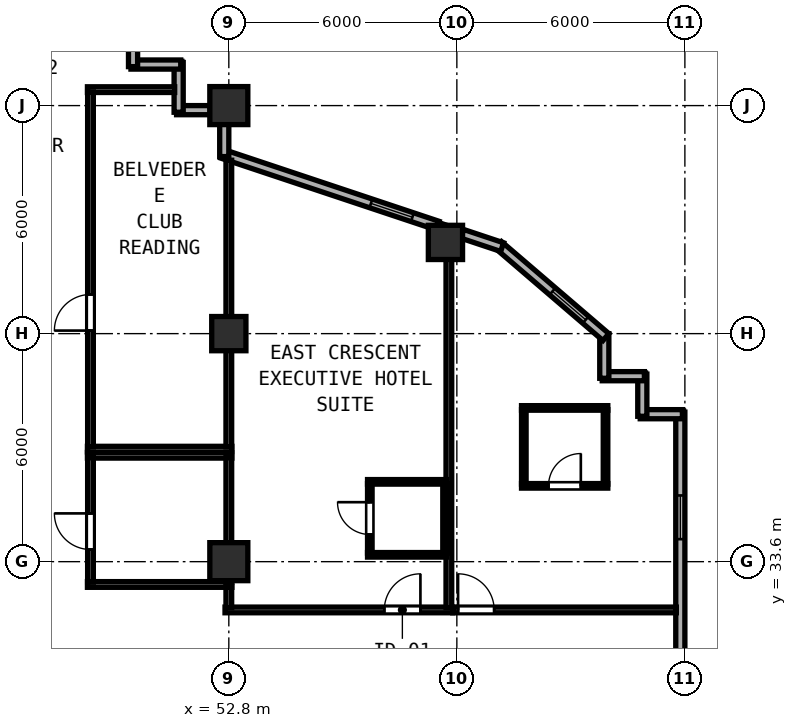
"""IFC4 building model, lengths in metres.
Left out: names, types, materials, properties, quantities, classifications, styles, units other than length and angle.
Written with IfcOpenShell. Run it as: python <this file> out.ifc"""

import sys

from ifc_helpers import new_model, si_unit, direction, frame, frame_2d, origin, origin_2d, place, context, subcontext, project, spatial, rectangle, hollow_rectangle, extrude, element, fill, save


model = new_model("IFC4")
c1 = context("Model", 3, precision=1e-05, world=origin(), true_north=direction((0.0, 1.0)))
c2 = subcontext(c1, "Body", "Model", "MODEL_VIEW")
j1 = project(units=[si_unit("LENGTHUNIT", "METRE"), si_unit("PLANEANGLEUNIT", "RADIAN")], contexts=[c1])
p1 = place(None, origin())
s1 = spatial("IfcSite", under=j1, at=p1, CompositionType="ELEMENT")
p2 = place(p1, origin())
s2 = spatial("IfcBuilding", under=s1, at=p2, CompositionType="ELEMENT")
p3 = place(p2, frame((0.0, 0.0, 98.4)))
s3 = spatial("IfcBuildingStorey", under=s2, at=p3, CompositionType="ELEMENT", Elevation=98.4)
for number, where, z_axis, x_axis in (
    (1, (52.8, 33.6, 0.0), (0.0, 0.0, 1.0), (1.0, 0.0, 0.0)),
    (2, (52.8, 45.6, 0.0), (0.0, 0.0, 1.0), (1.0, 0.0, 0.0)),
):
    element("IfcColumn", number, at=place(p3, frame(where, z_axis=z_axis, x_axis=x_axis)), inside=s3, PredefinedType="COLUMN", context=c2, shape_type="SweptSolid", body=[
        extrude(hollow_rectangle(XDim=1.0, YDim=1.0, WallThickness=0.038, at=origin_2d()), origin(), (0.0, 0.0, 1.0), 3.8),
    ])
for number, where, z_axis, x_axis in (
    (3, (52.8, 39.6, 0.0), (0.0, 0.0, 1.0), (1.0, 0.0, 0.0)),
    (4, (58.5, 42.0, 0.0), (0.0, 0.0, 1.0), (1.0, 0.0, 0.0)),
):
    element("IfcColumn", number, at=place(p3, frame(where, z_axis=z_axis, x_axis=x_axis)), inside=s3, PredefinedType="COLUMN", context=c2, shape_type="SweptSolid", body=[
        extrude(hollow_rectangle(XDim=0.9, YDim=0.9, WallThickness=0.034, at=origin_2d()), origin(), (0.0, 0.0, 1.0), 3.8),
    ])
p4 = place(p3, frame((64.68, 28.092, 0.0), z_axis=(0.0, 0.0, 1.0), x_axis=(0.0, 1.0, 0.0)))
e5 = element("IfcWall", 5, at=p4, inside=s3, PredefinedType="SOLIDWALL", context=c2, shape_type="SweptSolid", body=[
    extrude(rectangle(XDim=9.443, YDim=0.24, at=frame_2d((4.721, 0.0))), origin(), (0.0, 0.0, 1.0), 3.6),
])
p5 = place(p4, frame((0.7, 0.0, 0.85)))
e6 = element("IfcOpeningElement", 6, at=p5, cuts=e5, PredefinedType="OPENING", context=c2, shape_type="SweptSolid", body=[
    extrude(rectangle(XDim=1.15, YDim=1.8, at=frame_2d((0.575, 0.9))), frame((0.0, 0.13, 0.0), z_axis=(0.0, -1.0, 0.0), x_axis=(1.0, 0.0, 0.0)), (0.0, 0.0, 1.0), 0.26),
])
p6 = place(p4, frame((6.1, 0.0, 0.85)))
e7 = element("IfcOpeningElement", 7, at=p6, cuts=e5, PredefinedType="OPENING", context=c2, shape_type="SweptSolid", body=[
    extrude(rectangle(XDim=1.15, YDim=1.8, at=frame_2d((0.575, 0.9))), frame((0.0, 0.13, 0.0), z_axis=(0.0, -1.0, 0.0), x_axis=(1.0, 0.0, 0.0)), (0.0, 0.0, 1.0), 0.26),
])
p7 = place(p3, frame((64.735, 37.48, 0.0), z_axis=(0.0, 0.0, 1.0), x_axis=(-1.0, 0.0, 0.0)))
e8 = element("IfcWall", 8, at=p7, inside=s3, PredefinedType="SOLIDWALL", context=c2, shape_type="SweptSolid", body=[
    extrude(rectangle(XDim=1.11, YDim=0.24, at=frame_2d((0.555, 0.0))), origin(), (0.0, 0.0, 1.0), 3.6),
])
p8 = place(p3, frame((63.68, 37.425, 0.0), z_axis=(0.0, 0.0, 1.0), x_axis=(0.0, 1.0, 0.0)))
e9 = element("IfcWall", 9, at=p8, inside=s3, PredefinedType="SOLIDWALL", context=c2, shape_type="SweptSolid", body=[
    extrude(rectangle(XDim=1.11, YDim=0.24, at=frame_2d((0.555, 0.0))), origin(), (0.0, 0.0, 1.0), 3.6),
])
p9 = place(p3, frame((63.735, 38.48, 0.0), z_axis=(0.0, 0.0, 1.0), x_axis=(-1.0, 0.0, 0.0)))
e10 = element("IfcWall", 10, at=p9, inside=s3, PredefinedType="SOLIDWALL", context=c2, shape_type="SweptSolid", body=[
    extrude(rectangle(XDim=1.11, YDim=0.24, at=frame_2d((0.555, 0.0))), origin(), (0.0, 0.0, 1.0), 3.6),
])
p10 = place(p3, frame((62.68, 38.425, 0.0), z_axis=(0.0, 0.0, 1.0), x_axis=(0.0, 1.0, 0.0)))
e11 = element("IfcWall", 11, at=p10, inside=s3, PredefinedType="SOLIDWALL", context=c2, shape_type="SweptSolid", body=[
    extrude(rectangle(XDim=1.175, YDim=0.24, at=frame_2d((0.587, 0.0))), origin(), (0.0, 0.0, 1.0), 3.6),
])
p11 = place(p3, frame((62.722, 39.509, 0.0), z_axis=(0.0, 0.0, 1.0), x_axis=(-0.759247334792, 0.650802185469, 0.0)))
e12 = element("IfcWall", 12, at=p11, inside=s3, PredefinedType="SOLIDWALL", context=c2, shape_type="SweptSolid", body=[
    extrude(rectangle(XDim=3.719, YDim=0.24, at=frame_2d((1.86, 0.0))), origin(), (0.0, 0.0, 1.0), 3.6),
])
p12 = place(p11, frame((0.7, 0.0, 0.85)))
e13 = element("IfcOpeningElement", 13, at=p12, cuts=e12, PredefinedType="OPENING", context=c2, shape_type="SweptSolid", body=[
    extrude(rectangle(XDim=1.15, YDim=1.8, at=frame_2d((0.575, 0.9))), frame((0.0, 0.13, 0.0), z_axis=(0.0, -1.0, 0.0), x_axis=(1.0, 0.0, 0.0)), (0.0, 0.0, 1.0), 0.26),
])
p13 = place(p3, frame((59.992, 41.876, 0.0), z_axis=(0.0, 0.0, 1.0), x_axis=(-0.948661238983, 0.316293935527, 0.0)))
e14 = element("IfcWall", 14, at=p13, inside=s3, PredefinedType="SOLIDWALL", context=c2, shape_type="SweptSolid", body=[
    extrude(rectangle(XDim=1.107, YDim=0.24, at=frame_2d((0.553, 0.0))), origin(), (0.0, 0.0, 1.0), 3.6),
])
p14 = place(p3, frame((58.295, 42.442, 0.0), z_axis=(0.0, 0.0, 1.0), x_axis=(-0.948687385027, 0.316215504823, 0.0)))
e15 = element("IfcWall", 15, at=p14, inside=s3, PredefinedType="SOLIDWALL", context=c2, shape_type="SweptSolid", body=[
    extrude(rectangle(XDim=5.973, YDim=0.24, at=frame_2d((2.987, 0.0))), origin(), (0.0, 0.0, 1.0), 3.145),
])
p15 = place(p14, frame((0.7, 0.0, 0.85)))
e16 = element("IfcOpeningElement", 16, at=p15, cuts=e15, PredefinedType="OPENING", context=c2, shape_type="SweptSolid", body=[
    extrude(rectangle(XDim=1.15, YDim=1.8, at=frame_2d((0.575, 0.9))), frame((0.0, 0.13, 0.0), z_axis=(0.0, -1.0, 0.0), x_axis=(1.0, 0.0, 0.0)), (0.0, 0.0, 1.0), 0.26),
])
p16 = place(p3, frame((52.68, 44.259, 0.0), z_axis=(0.0, 0.0, 1.0), x_axis=(0.0, 1.0, 0.0)))
e17 = element("IfcWall", 17, at=p16, inside=s3, PredefinedType="SOLIDWALL", context=c2, shape_type="SweptSolid", body=[
    extrude(rectangle(XDim=0.849, YDim=0.24, at=frame_2d((0.425, 0.0))), origin(), (0.0, 0.0, 1.0), 3.145),
])
p17 = place(p3, frame((52.308, 45.48, 0.0), z_axis=(0.0, 0.0, 1.0), x_axis=(-1.0, 0.0, 0.0)))
e18 = element("IfcWall", 18, at=p17, inside=s3, PredefinedType="SOLIDWALL", context=c2, shape_type="SweptSolid", body=[
    extrude(rectangle(XDim=0.883, YDim=0.24, at=frame_2d((0.441, 0.0))), origin(), (0.0, 0.0, 1.0), 3.6),
])
p18 = place(p3, frame((51.48, 45.425, 0.0), z_axis=(0.0, 0.0, 1.0), x_axis=(0.0, 1.0, 0.0)))
e19 = element("IfcWall", 19, at=p18, inside=s3, PredefinedType="SOLIDWALL", context=c2, shape_type="SweptSolid", body=[
    extrude(rectangle(XDim=1.31, YDim=0.24, at=frame_2d((0.655, 0.0))), origin(), (0.0, 0.0, 1.0), 3.6),
])
p19 = place(p3, frame((51.535, 46.68, 0.0), z_axis=(0.0, 0.0, 1.0), x_axis=(-1.0, 0.0, 0.0)))
e20 = element("IfcWall", 20, at=p19, inside=s3, PredefinedType="SOLIDWALL", context=c2, shape_type="SweptSolid", body=[
    extrude(rectangle(XDim=1.31, YDim=0.24, at=frame_2d((0.655, 0.0))), origin(), (0.0, 0.0, 1.0), 3.6),
])
p20 = place(p3, frame((50.28, 46.625, 0.0), z_axis=(0.0, 0.0, 1.0), x_axis=(0.0, 1.0, 0.0)))
e21 = element("IfcWall", 21, at=p20, inside=s3, PredefinedType="SOLIDWALL", context=c2, shape_type="SweptSolid", body=[
    extrude(rectangle(XDim=1.54, YDim=0.24, at=frame_2d((0.77, 0.0))), origin(), (0.0, 0.0, 1.0), 3.6),
])
for number, where, z_axis, x_axis in (
    (22, (49.08, 36.4, 0.0), (0.0, 0.0, 1.0), (1.0, 0.0, 0.0)),
    (23, (49.08, 33.0, 0.0), (0.0, 0.0, 1.0), (1.0, 0.0, 0.0)),
):
    element("IfcWall", number, at=place(p3, frame(where, z_axis=z_axis, x_axis=x_axis)), inside=s3, PredefinedType="PARTITIONING", context=c2, shape_type="SweptSolid", body=[
        extrude(rectangle(XDim=3.8, YDim=0.15, at=frame_2d((1.9, 0.0))), origin(), (0.0, 0.0, 1.0), 3.6),
    ])
p21 = place(p3, frame((49.16, 33.06, 0.0), z_axis=(0.0, 0.0, 1.0), x_axis=(0.0, 1.0, 0.0)))
e24 = element("IfcWall", 24, at=p21, inside=s3, PredefinedType="PARTITIONING", context=c2, shape_type="SweptSolid", body=[
    extrude(rectangle(XDim=3.28, YDim=0.15, at=frame_2d((1.64, 0.0))), origin(), (0.0, 0.0, 1.0), 3.6),
])
p22 = place(p21, frame((0.86, 0.0, 0.0)))
e25 = element("IfcOpeningElement", 25, at=p22, cuts=e24, PredefinedType="OPENING", context=c2, shape_type="SweptSolid", body=[
    extrude(rectangle(XDim=0.95, YDim=2.12, at=frame_2d((0.475, 1.06))), frame((0.0, 0.085, 0.0), z_axis=(0.0, -1.0, 0.0), x_axis=(1.0, 0.0, 0.0)), (0.0, 0.0, 1.0), 0.17),
])
p23 = place(p3, frame((52.8, 33.06, 0.0), z_axis=(0.0, 0.0, 1.0), x_axis=(0.0, 1.0, 0.0)))
e26 = element("IfcWall", 26, at=p23, inside=s3, PredefinedType="PARTITIONING", context=c2, shape_type="SweptSolid", body=[
    extrude(rectangle(XDim=3.28, YDim=0.15, at=frame_2d((1.64, 0.0))), origin(), (0.0, 0.0, 1.0), 3.145),
])
p24 = place(p3, frame((49.08, 46.02, 0.0), z_axis=(0.0, 0.0, 1.0), x_axis=(1.0, 0.0, 0.0)))
e27 = element("IfcWall", 27, at=p24, inside=s3, PredefinedType="PARTITIONING", context=c2, shape_type="SweptSolid", body=[
    extrude(rectangle(XDim=2.295, YDim=0.15, at=frame_2d((1.147, 0.0))), origin(), (0.0, 0.0, 1.0), 3.6),
])
p25 = place(p3, frame((49.08, 36.56, 0.0), z_axis=(0.0, 0.0, 1.0), x_axis=(1.0, 0.0, 0.0)))
e28 = element("IfcWall", 28, at=p25, inside=s3, PredefinedType="PARTITIONING", context=c2, shape_type="SweptSolid", body=[
    extrude(rectangle(XDim=3.8, YDim=0.15, at=frame_2d((1.9, 0.0))), origin(), (0.0, 0.0, 1.0), 3.6),
])
p26 = place(p3, frame((49.16, 36.62, 0.0), z_axis=(0.0, 0.0, 1.0), x_axis=(0.0, 1.0, 0.0)))
e29 = element("IfcWall", 29, at=p26, inside=s3, PredefinedType="PARTITIONING", context=c2, shape_type="SweptSolid", body=[
    extrude(rectangle(XDim=9.34, YDim=0.15, at=frame_2d((4.67, 0.0))), origin(), (0.0, 0.0, 1.0), 3.6),
])
p27 = place(p26, frame((3.06, 0.0, 0.0)))
e30 = element("IfcOpeningElement", 30, at=p27, cuts=e29, PredefinedType="OPENING", context=c2, shape_type="SweptSolid", body=[
    extrude(rectangle(XDim=0.95, YDim=2.12, at=frame_2d((0.475, 1.06))), frame((0.0, 0.085, 0.0), z_axis=(0.0, -1.0, 0.0), x_axis=(1.0, 0.0, 0.0)), (0.0, 0.0, 1.0), 0.17),
])
p28 = place(p3, frame((52.8, 36.62, 0.0), z_axis=(0.0, 0.0, 1.0), x_axis=(0.0, 1.0, 0.0)))
e31 = element("IfcWall", 31, at=p28, inside=s3, PredefinedType="PARTITIONING", context=c2, shape_type="SweptSolid", body=[
    extrude(rectangle(XDim=7.543, YDim=0.15, at=frame_2d((3.771, 0.0))), origin(), (0.0, 0.0, 1.0), 3.145),
])
p29 = place(p3, frame((52.7, 32.33, 0.0), z_axis=(0.0, 0.0, 1.0), x_axis=(1.0, 0.0, 0.0)))
e32 = element("IfcWall", 32, at=p29, inside=s3, PredefinedType="PARTITIONING", context=c2, shape_type="SweptSolid", body=[
    extrude(rectangle(XDim=5.99, YDim=0.15, at=frame_2d((2.995, 0.0))), origin(), (0.0, 0.0, 1.0), 3.6),
])
p30 = place(p29, frame((4.191, 0.0, 0.0)))
e33 = element("IfcOpeningElement", 33, at=p30, cuts=e32, PredefinedType="OPENING", context=c2, shape_type="SweptSolid", body=[
    extrude(rectangle(XDim=0.95, YDim=2.18, at=frame_2d((0.475, 1.09))), frame((0.0, 0.085, 0.0), z_axis=(0.0, -1.0, 0.0), x_axis=(1.0, 0.0, 0.0)), (0.0, 0.0, 1.0), 0.17),
])
p31 = place(p3, frame((52.8, 32.39, 0.0), z_axis=(0.0, 0.0, 1.0), x_axis=(0.0, 1.0, 0.0)))
e34 = element("IfcWall", 34, at=p31, inside=s3, PredefinedType="PARTITIONING", context=c2, shape_type="SweptSolid", body=[
    extrude(rectangle(XDim=0.55, YDim=0.15, at=frame_2d((0.275, 0.0))), origin(), (0.0, 0.0, 1.0), 3.145),
])
p32 = place(p3, frame((58.59, 32.39, 0.0), z_axis=(0.0, 0.0, 1.0), x_axis=(0.0, 1.0, 0.0)))
e35 = element("IfcWall", 35, at=p32, inside=s3, PredefinedType="PARTITIONING", context=c2, shape_type="SweptSolid", body=[
    extrude(rectangle(XDim=9.857, YDim=0.15, at=frame_2d((4.928, 0.0))), origin(), (0.0, 0.0, 1.0), 3.6),
])
for number, where, z_axis, x_axis in (
    (36, (56.45, 35.7, 0.0), (0.0, 0.0, 1.0), (1.0, 0.0, 0.0)),
    (37, (56.45, 33.78, 0.0), (0.0, 0.0, 1.0), (1.0, 0.0, 0.0)),
):
    element("IfcWall", number, at=place(p3, frame(where, z_axis=z_axis, x_axis=x_axis)), inside=s3, PredefinedType="PARTITIONING", context=c2, shape_type="SweptSolid", body=[
        extrude(rectangle(XDim=2.08, YDim=0.12, at=frame_2d((1.04, 0.0))), origin(), (0.0, 0.0, 1.0), 3.6),
    ])
p33 = place(p3, frame((56.51, 33.825, 0.0), z_axis=(0.0, 0.0, 1.0), x_axis=(0.0, 1.0, 0.0)))
e38 = element("IfcWall", 38, at=p33, inside=s3, PredefinedType="PARTITIONING", context=c2, shape_type="SweptSolid", body=[
    extrude(rectangle(XDim=1.83, YDim=0.12, at=frame_2d((0.915, 0.0))), origin(), (0.0, 0.0, 1.0), 3.6),
])
p34 = place(p33, frame((1.34, 0.0, 0.0), z_axis=(0.0, 0.0, 1.0), x_axis=(-1.0, 0.0, 0.0)))
e39 = element("IfcOpeningElement", 39, at=p34, cuts=e38, PredefinedType="OPENING", context=c2, shape_type="SweptSolid", body=[
    extrude(rectangle(XDim=0.85, YDim=2.1, at=frame_2d((0.425, 1.05))), frame((0.0, 0.07, 0.0), z_axis=(0.0, -1.0, 0.0), x_axis=(1.0, 0.0, 0.0)), (0.0, 0.0, 1.0), 0.14),
])
p35 = place(p3, frame((58.49, 33.825, 0.0), z_axis=(0.0, 0.0, 1.0), x_axis=(0.0, 1.0, 0.0)))
e40 = element("IfcWall", 40, at=p35, inside=s3, PredefinedType="PARTITIONING", context=c2, shape_type="SweptSolid", body=[
    extrude(rectangle(XDim=1.83, YDim=0.12, at=frame_2d((0.915, 0.0))), origin(), (0.0, 0.0, 1.0), 3.6),
])
p36 = place(p3, frame((58.692, 32.33, 0.0), z_axis=(0.0, 0.0, 1.0), x_axis=(1.0, 0.0, 0.0)))
e41 = element("IfcWall", 41, at=p36, inside=s3, PredefinedType="PARTITIONING", context=c2, shape_type="SweptSolid", body=[
    extrude(rectangle(XDim=5.883, YDim=0.15, at=frame_2d((2.941, 0.0))), origin(), (0.0, 0.0, 1.0), 3.6),
])
p37 = place(p36, frame((0.14, 0.0, 0.0)))
e42 = element("IfcOpeningElement", 42, at=p37, cuts=e41, PredefinedType="OPENING", context=c2, shape_type="SweptSolid", body=[
    extrude(rectangle(XDim=0.95, YDim=2.18, at=frame_2d((0.475, 1.09))), frame((0.0, 0.085, 0.0), z_axis=(0.0, -1.0, 0.0), x_axis=(1.0, 0.0, 0.0)), (0.0, 0.0, 1.0), 0.17),
])
p38 = place(p3, frame((60.502, 37.645, 0.0), z_axis=(0.0, 0.0, 1.0), x_axis=(1.0, 0.0, 0.0)))
e43 = element("IfcWall", 43, at=p38, inside=s3, PredefinedType="PARTITIONING", context=c2, shape_type="SweptSolid", body=[
    extrude(rectangle(XDim=2.27, YDim=0.12, at=frame_2d((1.135, 0.0))), origin(), (0.0, 0.0, 1.0), 3.6),
])
p39 = place(p3, frame((60.502, 35.595, 0.0), z_axis=(0.0, 0.0, 1.0), x_axis=(1.0, 0.0, 0.0)))
e44 = element("IfcWall", 44, at=p39, inside=s3, PredefinedType="PARTITIONING", context=c2, shape_type="SweptSolid", body=[
    extrude(rectangle(XDim=2.27, YDim=0.12, at=frame_2d((1.135, 0.0))), origin(), (0.0, 0.0, 1.0), 3.6),
])
p40 = place(p39, frame((0.71, 0.0, 0.0)))
e45 = element("IfcOpeningElement", 45, at=p40, cuts=e44, PredefinedType="OPENING", context=c2, shape_type="SweptSolid", body=[
    extrude(rectangle(XDim=0.85, YDim=2.1, at=frame_2d((0.425, 1.05))), frame((0.0, 0.07, 0.0), z_axis=(0.0, -1.0, 0.0), x_axis=(1.0, 0.0, 0.0)), (0.0, 0.0, 1.0), 0.14),
])
for number, where, z_axis, x_axis in (
    (46, (60.562, 35.64, 0.0), (0.0, 0.0, 1.0), (0.0, 1.0, 0.0)),
    (47, (62.712, 35.64, 0.0), (0.0, 0.0, 1.0), (0.0, 1.0, 0.0)),
):
    element("IfcWall", number, at=place(p3, frame(where, z_axis=z_axis, x_axis=x_axis)), inside=s3, PredefinedType="PARTITIONING", context=c2, shape_type="SweptSolid", body=[
        extrude(rectangle(XDim=1.96, YDim=0.12, at=frame_2d((0.98, 0.0))), origin(), (0.0, 0.0, 1.0), 3.6),
    ])
p41 = place(p6, origin())
e48 = element("IfcWindow", 48, at=p41, inside=s3, PartitioningType="SINGLE_PANEL", PredefinedType="WINDOW", context=c2, shape_type="SweptSolid", body=[
    extrude(rectangle(XDim=1.15, YDim=1.8, at=frame_2d((0.575, 0.9))), frame((0.0, 0.03, 0.0), z_axis=(0.0, -1.0, 0.0), x_axis=(1.0, 0.0, 0.0)), (0.0, 0.0, 1.0), 0.06),
])
fill(e7, e48)
p42 = place(p12, origin())
e49 = element("IfcWindow", 49, at=p42, inside=s3, PartitioningType="SINGLE_PANEL", PredefinedType="WINDOW", context=c2, shape_type="SweptSolid", body=[
    extrude(rectangle(XDim=1.15, YDim=1.8, at=frame_2d((0.575, 0.9))), frame((0.0, 0.03, 0.0), z_axis=(0.0, -1.0, 0.0), x_axis=(1.0, 0.0, 0.0)), (0.0, 0.0, 1.0), 0.06),
])
fill(e13, e49)
p43 = place(p15, origin())
e50 = element("IfcWindow", 50, at=p43, inside=s3, PartitioningType="SINGLE_PANEL", PredefinedType="WINDOW", context=c2, shape_type="SweptSolid", body=[
    extrude(rectangle(XDim=1.15, YDim=1.8, at=frame_2d((0.575, 0.9))), frame((0.0, 0.03, 0.0), z_axis=(0.0, -1.0, 0.0), x_axis=(1.0, 0.0, 0.0)), (0.0, 0.0, 1.0), 0.06),
])
fill(e16, e50)
p44 = place(p22, origin())
e51 = element("IfcDoor", 51, at=p44, inside=s3, OperationType="SINGLE_SWING_RIGHT", PredefinedType="DOOR", context=c2, shape_type="SweptSolid", body=[
    extrude(rectangle(XDim=0.95, YDim=2.12, at=frame_2d((0.475, 1.06))), frame((0.0, 0.025, 0.0), z_axis=(0.0, -1.0, 0.0), x_axis=(1.0, 0.0, 0.0)), (0.0, 0.0, 1.0), 0.05),
])
fill(e25, e51)
p45 = place(p27, origin())
e52 = element("IfcDoor", 52, at=p45, inside=s3, OperationType="SINGLE_SWING_LEFT", PredefinedType="DOOR", context=c2, shape_type="SweptSolid", body=[
    extrude(rectangle(XDim=0.95, YDim=2.12, at=frame_2d((0.475, 1.06))), frame((0.0, 0.025, 0.0), z_axis=(0.0, -1.0, 0.0), x_axis=(1.0, 0.0, 0.0)), (0.0, 0.0, 1.0), 0.05),
])
fill(e30, e52)
p46 = place(p30, origin())
e53 = element("IfcDoor", 53, at=p46, inside=s3, OperationType="SINGLE_SWING_RIGHT", PredefinedType="DOOR", context=c2, shape_type="SweptSolid", body=[
    extrude(rectangle(XDim=0.95, YDim=2.18, at=frame_2d((0.475, 1.09))), frame((0.0, 0.025, 0.0), z_axis=(0.0, -1.0, 0.0), x_axis=(1.0, 0.0, 0.0)), (0.0, 0.0, 1.0), 0.05),
])
fill(e33, e53)
p47 = place(p34, origin())
e54 = element("IfcDoor", 54, at=p47, inside=s3, OperationType="SINGLE_SWING_LEFT", PredefinedType="DOOR", context=c2, shape_type="SweptSolid", body=[
    extrude(rectangle(XDim=0.85, YDim=2.1, at=frame_2d((0.425, 1.05))), frame((0.0, 0.025, 0.0), z_axis=(0.0, -1.0, 0.0), x_axis=(1.0, 0.0, 0.0)), (0.0, 0.0, 1.0), 0.05),
])
fill(e39, e54)
p48 = place(p37, origin())
e55 = element("IfcDoor", 55, at=p48, inside=s3, OperationType="SINGLE_SWING_LEFT", PredefinedType="DOOR", context=c2, shape_type="SweptSolid", body=[
    extrude(rectangle(XDim=0.95, YDim=2.18, at=frame_2d((0.475, 1.09))), frame((0.0, 0.025, 0.0), z_axis=(0.0, -1.0, 0.0), x_axis=(1.0, 0.0, 0.0)), (0.0, 0.0, 1.0), 0.05),
])
fill(e42, e55)
p49 = place(p40, origin())
e56 = element("IfcDoor", 56, at=p49, inside=s3, OperationType="SINGLE_SWING_RIGHT", PredefinedType="DOOR", context=c2, shape_type="SweptSolid", body=[
    extrude(rectangle(XDim=0.85, YDim=2.1, at=frame_2d((0.425, 1.05))), frame((0.0, 0.025, 0.0), z_axis=(0.0, -1.0, 0.0), x_axis=(1.0, 0.0, 0.0)), (0.0, 0.0, 1.0), 0.05),
])
fill(e45, e56)
save(model, sys.argv[1])
